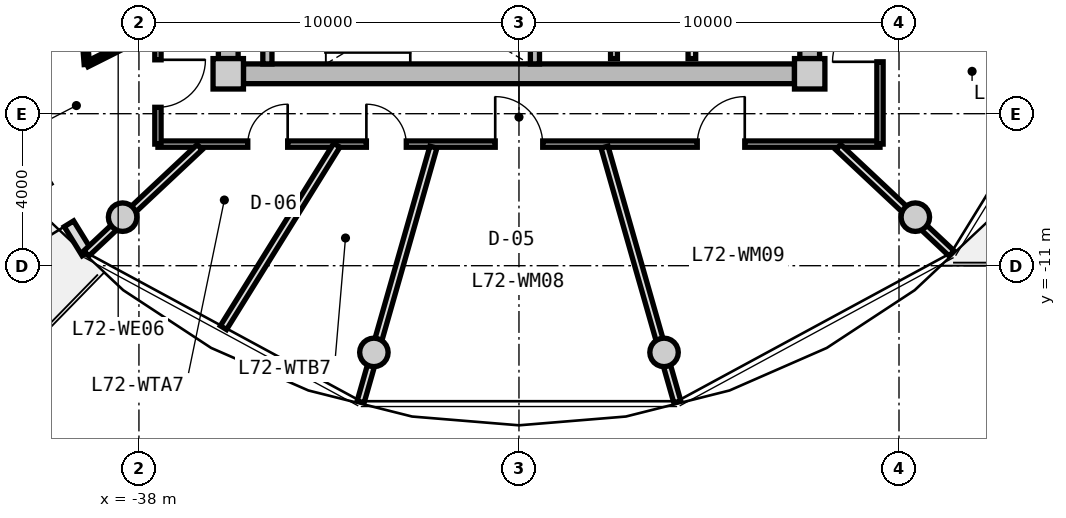
"""IFC4 building model, lengths in metres.
Left out: names, types, materials, properties, quantities, classifications, styles, units other than length and angle.
Written with IfcOpenShell. Run it as: python <this file> out.ifc"""

import sys

from ifc_helpers import new_model, si_unit, direction, frame, frame_2d, origin, origin_2d, place, context, subcontext, project, spatial, rectangle, circle, extrude, source, transform, mapped, element, fill, save


model = new_model("IFC4")
c1 = context("Model", 3, precision=1e-05, world=origin(), true_north=direction((0.0, 1.0)))
c2 = subcontext(c1, "Body", "Model", "MODEL_VIEW")
j1 = project(units=[si_unit("LENGTHUNIT", "METRE"), si_unit("PLANEANGLEUNIT", "RADIAN")], contexts=[c1])
p1 = place(None, origin())
s1 = spatial("IfcSite", under=j1, at=p1, CompositionType="ELEMENT")
p2 = place(p1, origin())
s2 = spatial("IfcBuilding", under=s1, at=p2, CompositionType="ELEMENT")
p3 = place(p2, frame((0.0, 0.0, 232.2)))
s3 = spatial("IfcBuildingStorey", under=s2, at=p3, CompositionType="ELEMENT", Elevation=232.2)
m1 = source(origin(), c2, "Body", "SweptSolid", [
    extrude(rectangle(XDim=0.8, YDim=0.8, at=origin_2d()), origin(), (0.0, 0.0, 1.0), 3.05),
])
for number, where, z_axis, x_axis in (
    (1, (-35.65, -5.95, 0.0), (0.0, 0.0, 1.0), (1.0, 0.0, 0.0)),
    (2, (-20.35, -5.95, 0.0), (0.0, 0.0, 1.0), (1.0, 0.0, 0.0)),
):
    element("IfcColumn", number, at=place(p3, frame(where, z_axis=z_axis, x_axis=x_axis)), inside=s3, PredefinedType="COLUMN", context=c2, shape_type="MappedRepresentation", body=[
        mapped(m1, transform((0.0, 0.0, 0.0), x_axis=(1.0, 0.0, 0.0), y_axis=(0.0, 1.0, 0.0), z_axis=(0.0, 0.0, 1.0), scale=1.0)),
    ])
m2 = source(origin(), c2, "Body", "SweptSolid", [
    extrude(rectangle(XDim=14.5, YDim=0.52, at=frame_2d((7.25, 0.0))), origin(), (0.0, 0.0, 1.0), 2.81),
])
p4 = place(p3, frame((-20.75, -5.95, 0.0), z_axis=(0.0, 0.0, 1.0), x_axis=(-1.0, 0.0, 0.0)))
e3 = element("IfcWall", 3, at=p4, inside=s3, PredefinedType="SHEAR", context=c2, shape_type="MappedRepresentation", body=[
    mapped(m2, transform((0.0, 0.0, 0.0), x_axis=(1.0, 0.0, 0.0), y_axis=(0.0, 1.0, 0.0), z_axis=(0.0, 0.0, 1.0), scale=1.0)),
])
m3 = source(origin(), c2, "Body", "SweptSolid", [
    extrude(rectangle(XDim=11.1, YDim=0.52, at=frame_2d((5.55, 0.0))), origin(), (0.0, 0.0, 1.0), 2.81),
])
p5 = place(p3, frame((-35.65, -5.55, 0.0), z_axis=(0.0, 0.0, 1.0), x_axis=(0.0, 1.0, 0.0)))
e4 = element("IfcWall", 4, at=p5, inside=s3, PredefinedType="SHEAR", context=c2, shape_type="MappedRepresentation", body=[
    mapped(m3, transform((0.0, 0.0, 0.0), x_axis=(1.0, 0.0, 0.0), y_axis=(0.0, 1.0, 0.0), z_axis=(0.0, 0.0, 1.0), scale=1.0)),
])
p6 = place(p5, frame((3.8, 0.0, 0.0)))
e5 = element("IfcOpeningElement", 5, at=p6, cuts=e4, PredefinedType="OPENING", context=c2, shape_type="SweptSolid", body=[
    extrude(rectangle(XDim=1.2, YDim=2.15, at=frame_2d((0.6, 1.075))), frame((0.0, 0.27, 0.0), z_axis=(0.0, -1.0, 0.0), x_axis=(1.0, 0.0, 0.0)), (0.0, 0.0, 1.0), 0.54),
])
p7 = place(p3, frame((-20.35, 5.55, 0.0), z_axis=(0.0, 0.0, 1.0), x_axis=(0.0, -1.0, 0.0)))
e6 = element("IfcWall", 6, at=p7, inside=s3, PredefinedType="SHEAR", context=c2, shape_type="MappedRepresentation", body=[
    mapped(m3, transform((0.0, 0.0, 0.0), x_axis=(1.0, 0.0, 0.0), y_axis=(0.0, 1.0, 0.0), z_axis=(0.0, 0.0, 1.0), scale=1.0)),
])
p8 = place(p7, frame((5.65, 0.0, 0.0)))
e7 = element("IfcOpeningElement", 7, at=p8, cuts=e6, PredefinedType="OPENING", context=c2, shape_type="SweptSolid", body=[
    extrude(rectangle(XDim=1.2, YDim=2.15, at=frame_2d((0.6, 1.075))), frame((0.0, 0.27, 0.0), z_axis=(0.0, -1.0, 0.0), x_axis=(1.0, 0.0, 0.0)), (0.0, 0.0, 1.0), 0.54),
])
m4 = source(origin(), c2, "Body", "SweptSolid", [
    extrude(circle(Radius=0.375, at=origin_2d()), origin(), (0.0, 0.0, 1.0), 3.05),
])
for number, where, z_axis, x_axis in (
    (8, (-38.43, -9.723, 0.0), (0.0, 0.0, 1.0), (1.0, 0.0, 0.0)),
    (9, (-31.818, -13.281, 0.0), (0.0, 0.0, 1.0), (1.0, 0.0, 0.0)),
    (10, (-24.182, -13.281, 0.0), (0.0, 0.0, 1.0), (1.0, 0.0, 0.0)),
    (11, (-17.57, -9.723, 0.0), (0.0, 0.0, 1.0), (1.0, 0.0, 0.0)),
):
    element("IfcColumn", number, at=place(p3, frame(where, z_axis=z_axis, x_axis=x_axis)), inside=s3, PredefinedType="COLUMN", context=c2, shape_type="MappedRepresentation", body=[
        mapped(m4, transform((0.0, 0.0, 0.0), x_axis=(1.0, 0.0, 0.0), y_axis=(0.0, 1.0, 0.0), z_axis=(0.0, 0.0, 1.0), scale=1.0)),
    ])
m5 = source(origin(), c2, "Body", "SweptSolid", [
    extrude(rectangle(XDim=7.938, YDim=0.29, at=frame_2d((3.969, 0.0))), origin(), (0.0, 0.0, 1.0), 2.81),
])
p9 = place(p3, frame((-39.37, -10.663, 0.0), z_axis=(0.0, 0.0, 1.0), x_axis=(-0.524244987663, 0.851567491694, 0.0)))
e12 = element("IfcWall", 12, at=p9, inside=s3, PredefinedType="SOLIDWALL", context=c2, shape_type="MappedRepresentation", body=[
    mapped(m5, transform((0.0, 0.0, 0.0), x_axis=(1.0, 0.0, 0.0), y_axis=(0.0, 1.0, 0.0), z_axis=(0.0, 0.0, 1.0), scale=1.0)),
])
p10 = place(p9, frame((0.9, 0.0, 0.0)))
e13 = element("IfcOpeningElement", 13, at=p10, cuts=e12, PredefinedType="OPENING", context=c2, shape_type="SweptSolid", body=[
    extrude(rectangle(XDim=1.15, YDim=2.25, at=frame_2d((0.575, 1.125))), frame((0.0, 0.155, 0.0), z_axis=(0.0, -1.0, 0.0), x_axis=(1.0, 0.0, 0.0)), (0.0, 0.0, 1.0), 0.31),
])
p11 = place(p9, frame((4.319, 0.0, 0.85)))
e14 = element("IfcOpeningElement", 14, at=p11, cuts=e12, PredefinedType="OPENING", context=c2, shape_type="SweptSolid", body=[
    extrude(rectangle(XDim=1.2, YDim=1.5, at=frame_2d((0.6, 0.75))), frame((0.0, 0.155, 0.0), z_axis=(0.0, -1.0, 0.0), x_axis=(1.0, 0.0, 0.0)), (0.0, 0.0, 1.0), 0.31),
])
m6 = source(origin(), c2, "Body", "SweptSolid", [
    extrude(rectangle(XDim=3.24, YDim=0.24, at=frame_2d((1.62, 0.0))), origin(), (0.0, 0.0, 1.0), 2.81),
])
for number, where, z_axis, x_axis in (
    (15, (-34.62, -5.69, 0.0), (0.0, 0.0, 1.0), (0.0, 1.0, 0.0)),
    (16, (-27.58, -5.69, 0.0), (0.0, 0.0, 1.0), (0.0, 1.0, 0.0)),
):
    element("IfcWall", number, at=place(p3, frame(where, z_axis=z_axis, x_axis=x_axis)), inside=s3, PredefinedType="PARTITIONING", context=c2, shape_type="MappedRepresentation", body=[
        mapped(m6, transform((0.0, 0.0, 0.0), x_axis=(1.0, 0.0, 0.0), y_axis=(0.0, 1.0, 0.0), z_axis=(0.0, 0.0, 1.0), scale=1.0)),
    ])
m7 = source(origin(), c2, "Body", "SweptSolid", [
    extrude(rectangle(XDim=3.8, YDim=0.2, at=frame_2d((1.9, 0.0))), origin(), (0.0, 0.0, 1.0), 2.795),
])
p12 = place(p3, frame((-23.45, -5.55, 0.0), z_axis=(0.0, 0.0, 1.0), x_axis=(0.0, 1.0, 0.0)))
e17 = element("IfcWall", 17, at=p12, inside=s3, PredefinedType="PARTITIONING", context=c2, shape_type="MappedRepresentation", body=[
    mapped(m7, transform((0.0, 0.0, 0.0), x_axis=(1.0, 0.0, 0.0), y_axis=(0.0, 1.0, 0.0), z_axis=(0.0, 0.0, 1.0), scale=1.0)),
])
m8 = source(origin(), c2, "Body", "SweptSolid", [
    extrude(rectangle(XDim=4.2, YDim=0.18, at=frame_2d((2.1, 0.0))), origin(), (0.0, 0.0, 1.0), 2.795),
])
p13 = place(p3, frame((-25.5, -5.55, 0.0), z_axis=(0.0, 0.0, 1.0), x_axis=(0.0, 1.0, 0.0)))
e18 = element("IfcWall", 18, at=p13, inside=s3, PredefinedType="PARTITIONING", context=c2, shape_type="MappedRepresentation", body=[
    mapped(m8, transform((0.0, 0.0, 0.0), x_axis=(1.0, 0.0, 0.0), y_axis=(0.0, 1.0, 0.0), z_axis=(0.0, 0.0, 1.0), scale=1.0)),
])
m9 = source(origin(), c2, "Body", "SweptSolid", [
    extrude(rectangle(XDim=19.0, YDim=0.165, at=frame_2d((9.5, 0.0))), origin(), (0.0, 0.0, 1.0), 2.795),
])
p14 = place(p3, frame((-18.5, -7.8, 0.0), z_axis=(0.0, 0.0, 1.0), x_axis=(-1.0, 0.0, 0.0)))
e19 = element("IfcWall", 19, at=p14, inside=s3, PredefinedType="PARTITIONING", context=c2, shape_type="MappedRepresentation", body=[
    mapped(m9, transform((0.0, 0.0, 0.0), x_axis=(1.0, 0.0, 0.0), y_axis=(0.0, 1.0, 0.0), z_axis=(0.0, 0.0, 1.0), scale=1.0)),
])
p15 = place(p14, frame((15.586, 0.0, 0.0)))
e20 = element("IfcOpeningElement", 20, at=p15, cuts=e19, PredefinedType="OPENING", context=c2, shape_type="SweptSolid", body=[
    extrude(rectangle(XDim=1.05, YDim=2.15, at=frame_2d((0.525, 1.075))), frame((0.0, 0.093, 0.0), z_axis=(0.0, -1.0, 0.0), x_axis=(1.0, 0.0, 0.0)), (0.0, 0.0, 1.0), 0.185),
])
p16 = place(p14, frame((12.465, 0.0, 0.0)))
e21 = element("IfcOpeningElement", 21, at=p16, cuts=e19, PredefinedType="OPENING", context=c2, shape_type="SweptSolid", body=[
    extrude(rectangle(XDim=1.05, YDim=2.15, at=frame_2d((0.525, 1.075))), frame((0.0, 0.093, 0.0), z_axis=(0.0, -1.0, 0.0), x_axis=(1.0, 0.0, 0.0)), (0.0, 0.0, 1.0), 0.185),
])
p17 = place(p14, frame((8.875, 0.0, 0.0)))
e22 = element("IfcOpeningElement", 22, at=p17, cuts=e19, PredefinedType="OPENING", context=c2, shape_type="SweptSolid", body=[
    extrude(rectangle(XDim=1.25, YDim=2.2, at=frame_2d((0.625, 1.1))), frame((0.0, 0.093, 0.0), z_axis=(0.0, -1.0, 0.0), x_axis=(1.0, 0.0, 0.0)), (0.0, 0.0, 1.0), 0.185),
])
p18 = place(p14, frame((3.559, 0.0, 0.0)))
e23 = element("IfcOpeningElement", 23, at=p18, cuts=e19, PredefinedType="OPENING", context=c2, shape_type="SweptSolid", body=[
    extrude(rectangle(XDim=1.25, YDim=2.2, at=frame_2d((0.625, 1.1))), frame((0.0, 0.093, 0.0), z_axis=(0.0, -1.0, 0.0), x_axis=(1.0, 0.0, 0.0)), (0.0, 0.0, 1.0), 0.185),
])
m10 = source(origin(), c2, "Body", "SweptSolid", [
    extrude(rectangle(XDim=6.88, YDim=0.165, at=frame_2d((3.44, 0.0))), origin(), (0.0, 0.0, 1.0), 2.795),
])
p19 = place(p3, frame((-37.5, -7.8, 0.0), z_axis=(0.0, 0.0, 1.0), x_axis=(0.0, 1.0, 0.0)))
e24 = element("IfcWall", 24, at=p19, inside=s3, PredefinedType="PARTITIONING", context=c2, shape_type="MappedRepresentation", body=[
    mapped(m10, transform((0.0, 0.0, 0.0), x_axis=(1.0, 0.0, 0.0), y_axis=(0.0, 1.0, 0.0), z_axis=(0.0, 0.0, 1.0), scale=1.0)),
])
p20 = place(p19, frame((0.968, 0.0, 0.0)))
e25 = element("IfcOpeningElement", 25, at=p20, cuts=e24, PredefinedType="OPENING", context=c2, shape_type="SweptSolid", body=[
    extrude(rectangle(XDim=1.25, YDim=2.2, at=frame_2d((0.625, 1.1))), frame((0.0, 0.093, 0.0), z_axis=(0.0, -1.0, 0.0), x_axis=(1.0, 0.0, 0.0)), (0.0, 0.0, 1.0), 0.185),
])
p21 = place(p3, frame((-18.5, -0.92, 0.0), z_axis=(0.0, 0.0, 1.0), x_axis=(0.0, -1.0, 0.0)))
e26 = element("IfcWall", 26, at=p21, inside=s3, PredefinedType="PARTITIONING", context=c2, shape_type="MappedRepresentation", body=[
    mapped(m10, transform((0.0, 0.0, 0.0), x_axis=(1.0, 0.0, 0.0), y_axis=(0.0, 1.0, 0.0), z_axis=(0.0, 0.0, 1.0), scale=1.0)),
])
p22 = place(p21, frame((3.464, 0.0, 0.0)))
e27 = element("IfcOpeningElement", 27, at=p22, cuts=e26, PredefinedType="OPENING", context=c2, shape_type="SweptSolid", body=[
    extrude(rectangle(XDim=1.25, YDim=2.2, at=frame_2d((0.625, 1.1))), frame((0.0, 0.093, 0.0), z_axis=(0.0, -1.0, 0.0), x_axis=(1.0, 0.0, 0.0)), (0.0, 0.0, 1.0), 0.185),
])
m11 = source(origin(), c2, "Body", "SweptSolid", [
    extrude(rectangle(XDim=4.089, YDim=0.19, at=frame_2d((2.044, 0.0))), origin(), (0.0, 0.0, 1.0), 2.395),
])
p23 = place(p3, frame((-36.402, -7.88, 0.0), z_axis=(0.0, 0.0, 1.0), x_axis=(-0.729401273609, -0.684086092577, 0.0)))
e28 = element("IfcWall", 28, at=p23, inside=s3, PredefinedType="PARTITIONING", context=c2, shape_type="MappedRepresentation", body=[
    mapped(m11, transform((0.0, 0.0, 0.0), x_axis=(1.0, 0.0, 0.0), y_axis=(0.0, 1.0, 0.0), z_axis=(0.0, 0.0, 1.0), scale=1.0)),
])
m12 = source(origin(), c2, "Body", "SweptSolid", [
    extrude(rectangle(XDim=2.06, YDim=0.14, at=frame_2d((1.03, 0.0))), origin(), (0.0, 0.0, 1.0), 2.795),
])
p24 = place(p3, frame((-37.53, -4.778, 0.0), z_axis=(0.0, 0.0, 1.0), x_axis=(-0.893952568722, -0.448161583444, 0.0)))
e29 = element("IfcWall", 29, at=p24, inside=s3, PredefinedType="PARTITIONING", context=c2, shape_type="MappedRepresentation", body=[
    mapped(m12, transform((0.0, 0.0, 0.0), x_axis=(1.0, 0.0, 0.0), y_axis=(0.0, 1.0, 0.0), z_axis=(0.0, 0.0, 1.0), scale=1.0)),
])
m13 = source(origin(), c2, "Body", "SweptSolid", [
    extrude(rectangle(XDim=2.798, YDim=0.14, at=frame_2d((1.399, 0.0))), origin(), (0.0, 0.0, 1.0), 2.795),
])
p25 = place(p3, frame((-39.371, -5.701, 0.0), z_axis=(0.0, 0.0, 1.0), x_axis=(-0.077823984089, 0.996967114553, 0.0)))
e30 = element("IfcWall", 30, at=p25, inside=s3, PredefinedType="PARTITIONING", context=c2, shape_type="MappedRepresentation", body=[
    mapped(m13, transform((0.0, 0.0, 0.0), x_axis=(1.0, 0.0, 0.0), y_axis=(0.0, 1.0, 0.0), z_axis=(0.0, 0.0, 1.0), scale=1.0)),
])
p26 = place(p25, frame((0.939, 0.0, 0.0)))
e31 = element("IfcOpeningElement", 31, at=p26, cuts=e30, PredefinedType="OPENING", context=c2, shape_type="SweptSolid", body=[
    extrude(rectangle(XDim=0.92, YDim=2.1, at=frame_2d((0.46, 1.05))), frame((0.0, 0.08, 0.0), z_axis=(0.0, -1.0, 0.0), x_axis=(1.0, 0.0, 0.0)), (0.0, 0.0, 1.0), 0.16),
])
m14 = source(origin(), c2, "Body", "SweptSolid", [
    extrude(rectangle(XDim=6.974, YDim=0.19, at=frame_2d((3.487, 0.0))), origin(), (0.0, 0.0, 1.0), 2.395),
])
p27 = place(p3, frame((-30.251, -7.88, 0.0), z_axis=(0.0, 0.0, 1.0), x_axis=(-0.274707256801, -0.961527910703, 0.0)))
e32 = element("IfcWall", 32, at=p27, inside=s3, PredefinedType="PARTITIONING", context=c2, shape_type="MappedRepresentation", body=[
    mapped(m14, transform((0.0, 0.0, 0.0), x_axis=(1.0, 0.0, 0.0), y_axis=(0.0, 1.0, 0.0), z_axis=(0.0, 0.0, 1.0), scale=1.0)),
])
m15 = source(origin(), c2, "Body", "SweptSolid", [
    extrude(rectangle(XDim=5.652, YDim=0.19, at=frame_2d((2.826, 0.0))), origin(), (0.0, 0.0, 1.0), 2.795),
])
p28 = place(p3, frame((-32.794, -7.83, 0.0), z_axis=(0.0, 0.0, 1.0), x_axis=(-0.527566076956, -0.84951399897, 0.0)))
e33 = element("IfcWall", 33, at=p28, inside=s3, PredefinedType="PARTITIONING", context=c2, shape_type="MappedRepresentation", body=[
    mapped(m15, transform((0.0, 0.0, 0.0), x_axis=(1.0, 0.0, 0.0), y_axis=(0.0, 1.0, 0.0), z_axis=(0.0, 0.0, 1.0), scale=1.0)),
])
p29 = place(p3, frame((-25.749, -7.88, 0.0), z_axis=(0.0, 0.0, 1.0), x_axis=(0.274707256801, -0.961527910703, 0.0)))
e34 = element("IfcWall", 34, at=p29, inside=s3, PredefinedType="PARTITIONING", context=c2, shape_type="MappedRepresentation", body=[
    mapped(m14, transform((0.0, 0.0, 0.0), x_axis=(1.0, 0.0, 0.0), y_axis=(0.0, 1.0, 0.0), z_axis=(0.0, 0.0, 1.0), scale=1.0)),
])
p30 = place(p3, frame((-19.598, -7.88, 0.0), z_axis=(0.0, 0.0, 1.0), x_axis=(0.729401273609, -0.684086092577, 0.0)))
e35 = element("IfcWall", 35, at=p30, inside=s3, PredefinedType="PARTITIONING", context=c2, shape_type="MappedRepresentation", body=[
    mapped(m11, transform((0.0, 0.0, 0.0), x_axis=(1.0, 0.0, 0.0), y_axis=(0.0, 1.0, 0.0), z_axis=(0.0, 0.0, 1.0), scale=1.0)),
])
m16 = source(origin(), c2, "Body", "SweptSolid", [
    extrude(rectangle(XDim=1.15, YDim=2.25, at=frame_2d((0.575, 1.125))), frame((0.0, 0.025, 0.0), z_axis=(0.0, -1.0, 0.0), x_axis=(1.0, 0.0, 0.0)), (0.0, 0.0, 1.0), 0.05),
])
p31 = place(p10, origin())
e36 = element("IfcDoor", 36, at=p31, inside=s3, OperationType="SINGLE_SWING_LEFT", PredefinedType="DOOR", context=c2, shape_type="MappedRepresentation", body=[
    mapped(m16, transform((0.0, 0.0, 0.0), x_axis=(1.0, 0.0, 0.0), y_axis=(0.0, 1.0, 0.0), z_axis=(0.0, 0.0, 1.0), scale=1.0)),
])
fill(e13, e36)
m17 = source(origin(), c2, "Body", "SweptSolid", [
    extrude(rectangle(XDim=1.25, YDim=2.2, at=frame_2d((0.625, 1.1))), frame((0.0, 0.025, 0.0), z_axis=(0.0, -1.0, 0.0), x_axis=(1.0, 0.0, 0.0)), (0.0, 0.0, 1.0), 0.05),
])
p32 = place(p20, frame((1.25, 0.0, 0.0), z_axis=(0.0, 0.0, 1.0), x_axis=(-1.0, 0.0, 0.0)))
e37 = element("IfcDoor", 37, at=p32, inside=s3, OperationType="SINGLE_SWING_LEFT", PredefinedType="DOOR", context=c2, shape_type="MappedRepresentation", body=[
    mapped(m17, transform((0.0, 0.0, 0.0), x_axis=(1.0, 0.0, 0.0), y_axis=(0.0, 1.0, 0.0), z_axis=(0.0, 0.0, 1.0), scale=1.0)),
])
fill(e25, e37)
m18 = source(origin(), c2, "Body", "SweptSolid", [
    extrude(rectangle(XDim=1.05, YDim=2.15, at=frame_2d((0.525, 1.075))), frame((0.0, 0.025, 0.0), z_axis=(0.0, -1.0, 0.0), x_axis=(1.0, 0.0, 0.0)), (0.0, 0.0, 1.0), 0.05),
])
p33 = place(p15, frame((1.05, 0.0, 0.0), z_axis=(0.0, 0.0, 1.0), x_axis=(-1.0, 0.0, 0.0)))
e38 = element("IfcDoor", 38, at=p33, inside=s3, OperationType="SINGLE_SWING_RIGHT", PredefinedType="DOOR", context=c2, shape_type="MappedRepresentation", body=[
    mapped(m18, transform((0.0, 0.0, 0.0), x_axis=(1.0, 0.0, 0.0), y_axis=(0.0, 1.0, 0.0), z_axis=(0.0, 0.0, 1.0), scale=1.0)),
])
fill(e20, e38)
p34 = place(p16, frame((1.05, 0.0, 0.0), z_axis=(0.0, 0.0, 1.0), x_axis=(-1.0, 0.0, 0.0)))
e39 = element("IfcDoor", 39, at=p34, inside=s3, OperationType="SINGLE_SWING_LEFT", PredefinedType="DOOR", context=c2, shape_type="MappedRepresentation", body=[
    mapped(m18, transform((0.0, 0.0, 0.0), x_axis=(1.0, 0.0, 0.0), y_axis=(0.0, 1.0, 0.0), z_axis=(0.0, 0.0, 1.0), scale=1.0)),
])
fill(e21, e39)
p35 = place(p17, frame((1.25, 0.0, 0.0), z_axis=(0.0, 0.0, 1.0), x_axis=(-1.0, 0.0, 0.0)))
e40 = element("IfcDoor", 40, at=p35, inside=s3, OperationType="SINGLE_SWING_LEFT", PredefinedType="DOOR", context=c2, shape_type="MappedRepresentation", body=[
    mapped(m17, transform((0.0, 0.0, 0.0), x_axis=(1.0, 0.0, 0.0), y_axis=(0.0, 1.0, 0.0), z_axis=(0.0, 0.0, 1.0), scale=1.0)),
])
fill(e22, e40)
p36 = place(p18, frame((1.25, 0.0, 0.0), z_axis=(0.0, 0.0, 1.0), x_axis=(-1.0, 0.0, 0.0)))
e41 = element("IfcDoor", 41, at=p36, inside=s3, OperationType="SINGLE_SWING_RIGHT", PredefinedType="DOOR", context=c2, shape_type="MappedRepresentation", body=[
    mapped(m17, transform((0.0, 0.0, 0.0), x_axis=(1.0, 0.0, 0.0), y_axis=(0.0, 1.0, 0.0), z_axis=(0.0, 0.0, 1.0), scale=1.0)),
])
fill(e23, e41)
p37 = place(p22, frame((1.25, 0.0, 0.0), z_axis=(0.0, 0.0, 1.0), x_axis=(-1.0, 0.0, 0.0)))
e42 = element("IfcDoor", 42, at=p37, inside=s3, OperationType="SINGLE_SWING_LEFT", PredefinedType="DOOR", context=c2, shape_type="MappedRepresentation", body=[
    mapped(m17, transform((0.0, 0.0, 0.0), x_axis=(1.0, 0.0, 0.0), y_axis=(0.0, 1.0, 0.0), z_axis=(0.0, 0.0, 1.0), scale=1.0)),
])
fill(e27, e42)
save(model, sys.argv[1])
